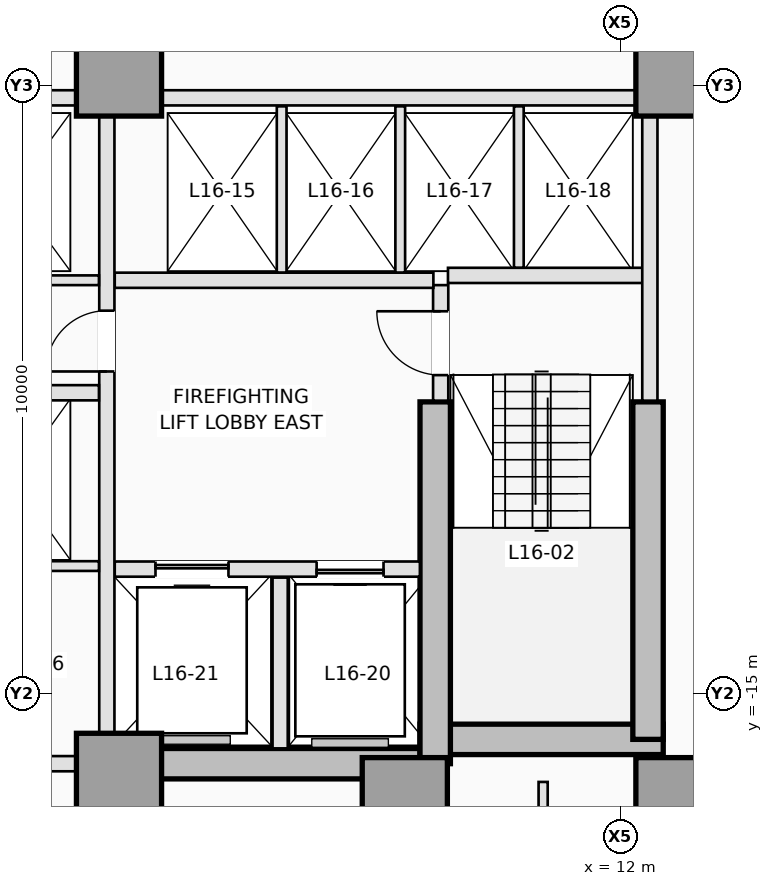
"""IFC4 building model, lengths in metres.
Left out: names, types, materials, properties, quantities, classifications, styles, units other than length and angle.
Written with IfcOpenShell. Run it as: python <this file> out.ifc"""

import sys

from ifc_helpers import new_model, si_unit, direction, frame, frame_2d, origin, origin_2d, place, context, subcontext, project, spatial, rectangle, extrude, element, fill, save


model = new_model("IFC4")
c1 = context("Model", 3, precision=1e-05, world=origin(), true_north=direction((0.0, 1.0)))
c2 = subcontext(c1, "Body", "Model", "MODEL_VIEW")
j1 = project(units=[si_unit("LENGTHUNIT", "METRE"), si_unit("PLANEANGLEUNIT", "RADIAN")], contexts=[c1])
p1 = place(None, origin())
s1 = spatial("IfcSite", under=j1, at=p1, CompositionType="ELEMENT")
p2 = place(p1, origin())
s2 = spatial("IfcBuilding", under=s1, at=p2, CompositionType="ELEMENT")
p3 = place(p2, frame((0.0, 0.0, 62.6)))
s3 = spatial("IfcBuildingStorey", under=s2, at=p3, CompositionType="ELEMENT", Elevation=62.6)
p4 = place(p3, frame((3.75, -16.15, 0.0), z_axis=(0.0, 0.0, 1.0), x_axis=(1.0, 0.0, 0.0)))
e1 = element("IfcWall", 1, at=p4, inside=s3, PredefinedType="SHEAR", context=c2, shape_type="SweptSolid", body=[
    extrude(rectangle(XDim=5.2, YDim=0.5, at=frame_2d((2.6, 0.0))), origin(), (0.0, 0.0, 1.0), 3.5),
])
p5 = place(p3, frame((8.7, -15.75, 0.0), z_axis=(0.0, 0.0, 1.0), x_axis=(1.0, 0.0, 0.0)))
e2 = element("IfcWall", 2, at=p5, inside=s3, PredefinedType="SHEAR", context=c2, shape_type="SweptSolid", body=[
    extrude(rectangle(XDim=4.0, YDim=0.5, at=frame_2d((2.0, 0.0))), origin(), (0.0, 0.0, 1.0), 3.5),
])
p6 = place(p3, frame((12.45, -15.75, 0.0), z_axis=(0.0, 0.0, 1.0), x_axis=(0.0, 1.0, 0.0)))
e3 = element("IfcWall", 3, at=p6, inside=s3, PredefinedType="SHEAR", context=c2, shape_type="SweptSolid", body=[
    extrude(rectangle(XDim=5.55, YDim=0.5, at=frame_2d((2.775, 0.0))), origin(), (0.0, 0.0, 1.0), 3.5),
])
p7 = place(p3, frame((8.95, -16.15, 0.0), z_axis=(0.0, 0.0, 1.0), x_axis=(0.0, 1.0, 0.0)))
e4 = element("IfcWall", 4, at=p7, inside=s3, PredefinedType="SHEAR", context=c2, shape_type="SweptSolid", body=[
    extrude(rectangle(XDim=5.95, YDim=0.5, at=frame_2d((2.975, 0.0))), origin(), (0.0, 0.0, 1.0), 3.5),
])
for number, where, z_axis, x_axis in (
    (5, (3.75, -16.35, 0.0), (0.0, 0.0, 1.0), (1.0, 0.0, 0.0)),
    (6, (8.45, -16.75, 0.0), (0.0, 0.0, 1.0), (1.0, 0.0, 0.0)),
    (7, (12.95, -16.75, 0.0), (0.0, 0.0, 1.0), (1.0, 0.0, 0.0)),
    (8, (3.75, -4.8, 0.0), (0.0, 0.0, 1.0), (1.0, 0.0, 0.0)),
    (9, (12.95, -4.8, 0.0), (0.0, 0.0, 1.0), (1.0, 0.0, 0.0)),
):
    element("IfcColumn", number, at=place(p3, frame(where, z_axis=z_axis, x_axis=x_axis)), inside=s3, PredefinedType="COLUMN", context=c2, shape_type="SweptSolid", body=[
        extrude(rectangle(XDim=1.4, YDim=1.4, at=origin_2d()), origin(), (0.0, 0.0, 1.0), 3.5),
    ])
p8 = place(p3, frame((9.04, -10.18, 0.0), z_axis=(0.0, 0.0, 1.0), x_axis=(0.0, 1.0, 0.0)))
e10 = element("IfcWall", 10, at=p8, inside=s3, PredefinedType="PARTITIONING", context=c2, shape_type="SweptSolid", body=[
    extrude(rectangle(XDim=1.9, YDim=0.25, at=frame_2d((0.95, 0.0))), origin(), (0.0, 0.0, 1.0), 3.25),
])
p9 = place(p8, frame((0.42, 0.0, 0.0)))
e11 = element("IfcOpeningElement", 11, at=p9, cuts=e10, PredefinedType="OPENING", context=c2, shape_type="SweptSolid", body=[
    extrude(rectangle(XDim=1.05, YDim=2.15, at=frame_2d((0.525, 1.075))), frame((0.0, 0.135, 0.0), z_axis=(0.0, -1.0, 0.0), x_axis=(1.0, 0.0, 0.0)), (0.0, 0.0, 1.0), 0.27),
])
p10 = place(p3, frame((9.16, -8.12, 0.0), z_axis=(0.0, 0.0, 1.0), x_axis=(1.0, 0.0, 0.0)))
e12 = element("IfcWall", 12, at=p10, inside=s3, PredefinedType="PARTITIONING", context=c2, shape_type="SweptSolid", body=[
    extrude(rectangle(XDim=3.22, YDim=0.25, at=frame_2d((1.61, 0.0))), origin(), (0.0, 0.0, 1.0), 3.25),
])
p11 = place(p3, frame((12.48, -10.18, 0.0), z_axis=(0.0, 0.0, 1.0), x_axis=(0.0, 1.0, 0.0)))
e13 = element("IfcWall", 13, at=p11, inside=s3, PredefinedType="PARTITIONING", context=c2, shape_type="SweptSolid", body=[
    extrude(rectangle(XDim=4.678, YDim=0.25, at=frame_2d((2.339, 0.0))), origin(), (0.0, 0.0, 1.0), 3.25),
])
p12 = place(p3, frame((3.68, -12.95, 0.0), z_axis=(0.0, 0.0, 1.0), x_axis=(1.0, 0.0, 0.0)))
e14 = element("IfcWall", 14, at=p12, inside=s3, PredefinedType="PARTITIONING", context=c2, shape_type="SweptSolid", body=[
    extrude(rectangle(XDim=5.018, YDim=0.25, at=frame_2d((2.509, 0.0))), origin(), (0.0, 0.0, 1.0), 3.25),
])
p13 = place(p12, frame((3.32, 0.0, 0.0)))
e15 = element("IfcOpeningElement", 15, at=p13, cuts=e14, PredefinedType="OPENING", context=c2, shape_type="SweptSolid", body=[
    extrude(rectangle(XDim=1.1, YDim=2.15, at=frame_2d((0.55, 1.075))), frame((0.0, 0.135, 0.0), z_axis=(0.0, -1.0, 0.0), x_axis=(1.0, 0.0, 0.0)), (0.0, 0.0, 1.0), 0.27),
])
p14 = place(p12, frame((0.67, 0.0, 0.0)))
e16 = element("IfcOpeningElement", 16, at=p14, cuts=e14, PredefinedType="OPENING", context=c2, shape_type="SweptSolid", body=[
    extrude(rectangle(XDim=1.2, YDim=2.15, at=frame_2d((0.6, 1.075))), frame((0.0, 0.135, 0.0), z_axis=(0.0, -1.0, 0.0), x_axis=(1.0, 0.0, 0.0)), (0.0, 0.0, 1.0), 0.27),
])
p15 = place(p3, frame((6.4, -15.898, 0.0), z_axis=(0.0, 0.0, 1.0), x_axis=(0.0, 1.0, 0.0)))
e17 = element("IfcWall", 17, at=p15, inside=s3, PredefinedType="PARTITIONING", context=c2, shape_type="SweptSolid", body=[
    extrude(rectangle(XDim=2.808, YDim=0.25, at=frame_2d((1.404, 0.0))), origin(), (0.0, 0.0, 1.0), 3.25),
])
p16 = place(p3, frame((3.68, -8.2, 0.0), z_axis=(0.0, 0.0, 1.0), x_axis=(1.0, 0.0, 0.0)))
e18 = element("IfcWall", 18, at=p16, inside=s3, PredefinedType="PARTITIONING", context=c2, shape_type="SweptSolid", body=[
    extrude(rectangle(XDim=5.24, YDim=0.25, at=frame_2d((2.62, 0.0))), origin(), (0.0, 0.0, 1.0), 3.25),
])
p17 = place(p3, frame((3.55, -15.648, 0.0), z_axis=(0.0, 0.0, 1.0), x_axis=(0.0, 1.0, 0.0)))
e19 = element("IfcWall", 19, at=p17, inside=s3, PredefinedType="PARTITIONING", context=c2, shape_type="SweptSolid", body=[
    extrude(rectangle(XDim=10.146, YDim=0.25, at=frame_2d((5.073, 0.0))), origin(), (0.0, 0.0, 1.0), 3.25),
])
p18 = place(p17, frame((5.948, 0.0, 0.0)))
e20 = element("IfcOpeningElement", 20, at=p18, cuts=e19, PredefinedType="OPENING", context=c2, shape_type="SweptSolid", body=[
    extrude(rectangle(XDim=1.0, YDim=2.15, at=frame_2d((0.5, 1.075))), frame((0.0, 0.135, 0.0), z_axis=(0.0, -1.0, 0.0), x_axis=(1.0, 0.0, 0.0)), (0.0, 0.0, 1.0), 0.27),
])
p19 = place(p3, frame((4.452, -5.2, 0.0), z_axis=(0.0, 0.0, 1.0), x_axis=(1.0, 0.0, 0.0)))
e21 = element("IfcWall", 21, at=p19, inside=s3, PredefinedType="PARTITIONING", context=c2, shape_type="SweptSolid", body=[
    extrude(rectangle(XDim=7.796, YDim=0.25, at=frame_2d((3.898, 0.0))), origin(), (0.0, 0.0, 1.0), 3.25),
])
p20 = place(p3, frame((0.95, -5.2, 0.0), z_axis=(0.0, 0.0, 1.0), x_axis=(1.0, 0.0, 0.0)))
e22 = element("IfcWall", 22, at=p20, inside=s3, PredefinedType="PARTITIONING", context=c2, shape_type="SweptSolid", body=[
    extrude(rectangle(XDim=2.098, YDim=0.25, at=frame_2d((1.049, 0.0))), origin(), (0.0, 0.0, 1.0), 3.25),
])
for number, where, z_axis, x_axis in (
    (23, (6.425, -8.073, 0.0), (0.0, 0.0, 1.0), (0.0, 1.0, 0.0)),
    (24, (8.375, -8.073, 0.0), (0.0, 0.0, 1.0), (0.0, 1.0, 0.0)),
):
    element("IfcWall", number, at=place(p3, frame(where, z_axis=z_axis, x_axis=x_axis)), inside=s3, PredefinedType="PARTITIONING", context=c2, shape_type="SweptSolid", body=[
        extrude(rectangle(XDim=2.733, YDim=0.16, at=frame_2d((1.366, 0.0))), origin(), (0.0, 0.0, 1.0), 3.25),
    ])
p21 = place(p3, frame((10.325, -7.993, 0.0), z_axis=(0.0, 0.0, 1.0), x_axis=(0.0, 1.0, 0.0)))
e25 = element("IfcWall", 25, at=p21, inside=s3, PredefinedType="PARTITIONING", context=c2, shape_type="SweptSolid", body=[
    extrude(rectangle(XDim=2.653, YDim=0.16, at=frame_2d((1.326, 0.0))), origin(), (0.0, 0.0, 1.0), 3.25),
])
p22 = place(p3, frame((-3.048, -16.15, 0.0), z_axis=(0.0, 0.0, 1.0), x_axis=(1.0, 0.0, 0.0)))
e26 = element("IfcWall", 26, at=p22, inside=s3, PredefinedType="PARTITIONING", context=c2, shape_type="SweptSolid", body=[
    extrude(rectangle(XDim=6.096, YDim=0.25, at=frame_2d((3.048, 0.0))), origin(), (0.0, 0.0, 1.0), 2.3),
])
p23 = place(p3, frame((0.95, -8.2, 0.0), z_axis=(0.0, 0.0, 1.0), x_axis=(1.0, 0.0, 0.0)))
e27 = element("IfcWall", 27, at=p23, inside=s3, PredefinedType="PARTITIONING", context=c2, shape_type="SweptSolid", body=[
    extrude(rectangle(XDim=2.47, YDim=0.16, at=frame_2d((1.235, 0.0))), origin(), (0.0, 0.0, 1.0), 3.25),
])
p24 = place(p3, frame((0.95, -10.05, 0.0), z_axis=(0.0, 0.0, 1.0), x_axis=(1.0, 0.0, 0.0)))
e28 = element("IfcWall", 28, at=p24, inside=s3, PredefinedType="PARTITIONING", context=c2, shape_type="SweptSolid", body=[
    extrude(rectangle(XDim=2.47, YDim=0.25, at=frame_2d((1.235, 0.0))), origin(), (0.0, 0.0, 1.0), 3.25),
])
p25 = place(p3, frame((-3.42, -12.9, 0.0), z_axis=(0.0, 0.0, 1.0), x_axis=(1.0, 0.0, 0.0)))
e29 = element("IfcWall", 29, at=p25, inside=s3, PredefinedType="PARTITIONING", context=c2, shape_type="SweptSolid", body=[
    extrude(rectangle(XDim=6.84, YDim=0.16, at=frame_2d((3.42, 0.0))), origin(), (0.0, 0.0, 1.0), 3.25),
])
p26 = place(p25, frame((2.98, 0.0, 0.0)))
e30 = element("IfcOpeningElement", 30, at=p26, cuts=e29, PredefinedType="OPENING", context=c2, shape_type="SweptSolid", body=[
    extrude(rectangle(XDim=0.88, YDim=2.12, at=frame_2d((0.44, 1.06))), frame((0.0, 0.09, 0.0), z_axis=(0.0, -1.0, 0.0), x_axis=(1.0, 0.0, 0.0)), (0.0, 0.0, 1.0), 0.18),
])
p27 = place(p3, frame((10.725, -20.688, 0.0), z_axis=(0.0, 0.0, 1.0), x_axis=(0.0, 1.0, 0.0)))
e31 = element("IfcWall", 31, at=p27, inside=s3, PredefinedType="PARTITIONING", context=c2, shape_type="SweptSolid", body=[
    extrude(rectangle(XDim=4.238, YDim=0.15, at=frame_2d((2.119, 0.0))), origin(), (0.0, 0.0, 1.0), 3.25),
])
p28 = place(p13, origin())
e32 = element("IfcDoor", 32, at=p28, inside=s3, OperationType="SLIDING_TO_RIGHT", PredefinedType="DOOR", context=c2, shape_type="SweptSolid", body=[
    extrude(rectangle(XDim=1.1, YDim=2.15, at=frame_2d((0.55, 1.075))), frame((0.0, 0.025, 0.0), z_axis=(0.0, -1.0, 0.0), x_axis=(1.0, 0.0, 0.0)), (0.0, 0.0, 1.0), 0.05),
])
fill(e15, e32)
p29 = place(p14, origin())
e33 = element("IfcDoor", 33, at=p29, inside=s3, OperationType="SLIDING_TO_LEFT", PredefinedType="DOOR", context=c2, shape_type="SweptSolid", body=[
    extrude(rectangle(XDim=1.2, YDim=2.15, at=frame_2d((0.6, 1.075))), frame((0.0, 0.025, 0.0), z_axis=(0.0, -1.0, 0.0), x_axis=(1.0, 0.0, 0.0)), (0.0, 0.0, 1.0), 0.05),
])
fill(e16, e33)
p30 = place(p9, origin())
e34 = element("IfcDoor", 34, at=p30, inside=s3, OperationType="SINGLE_SWING_RIGHT", PredefinedType="DOOR", context=c2, shape_type="SweptSolid", body=[
    extrude(rectangle(XDim=1.05, YDim=2.15, at=frame_2d((0.525, 1.075))), frame((0.0, 0.025, 0.0), z_axis=(0.0, -1.0, 0.0), x_axis=(1.0, 0.0, 0.0)), (0.0, 0.0, 1.0), 0.05),
])
fill(e11, e34)
p31 = place(p18, origin())
e35 = element("IfcDoor", 35, at=p31, inside=s3, OperationType="SINGLE_SWING_LEFT", PredefinedType="DOOR", context=c2, shape_type="SweptSolid", body=[
    extrude(rectangle(XDim=1.0, YDim=2.15, at=frame_2d((0.5, 1.075))), frame((0.0, 0.025, 0.0), z_axis=(0.0, -1.0, 0.0), x_axis=(1.0, 0.0, 0.0)), (0.0, 0.0, 1.0), 0.05),
])
fill(e20, e35)
save(model, sys.argv[1])
